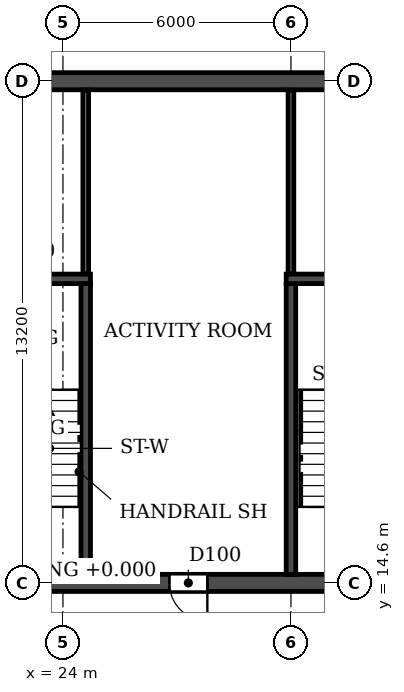
"""IFC4 building model, lengths in metres.
Left out: names, types, materials, properties, quantities, classifications, styles, units other than length and angle.
Written with IfcOpenShell. Run it as: python <this file> out.ifc"""

import sys

from ifc_helpers import new_model, si_unit, direction, frame, frame_2d, origin, place, context, subcontext, project, spatial, rectangle, extrude, element, fill, save


model = new_model("IFC4")
c1 = context("Model", 3, precision=1e-05, world=origin(), true_north=direction((0.0, 1.0)))
c2 = subcontext(c1, "Body", "Model", "MODEL_VIEW")
j1 = project(units=[si_unit("LENGTHUNIT", "METRE"), si_unit("PLANEANGLEUNIT", "RADIAN")], contexts=[c1])
p1 = place(None, origin())
s1 = spatial("IfcSite", under=j1, at=p1, CompositionType="ELEMENT")
p2 = place(p1, origin())
s2 = spatial("IfcBuilding", under=s1, at=p2, CompositionType="ELEMENT")
p3 = place(p2, frame((0.0, 0.0, 152.1)))
s3 = spatial("IfcBuildingStorey", under=s2, at=p3, CompositionType="ELEMENT", Elevation=152.1)
p4 = place(p3, frame((12.2, 14.6, 0.0), z_axis=(0.0, 0.0, 1.0), x_axis=(1.0, 0.0, 0.0)))
e1 = element("IfcWall", 1, at=p4, inside=s3, PredefinedType="SOLIDWALL", context=c2, shape_type="SweptSolid", body=[
    extrude(rectangle(XDim=77.6, YDim=0.45, at=frame_2d((38.8, 0.0))), origin(), (0.0, 0.0, 1.0), 3.07),
])
p5 = place(p4, frame((2.3, 0.0, 0.0)))
e2 = element("IfcOpeningElement", 2, at=p5, cuts=e1, PredefinedType="OPENING", context=c2, shape_type="SweptSolid", body=[
    extrude(rectangle(XDim=1.0, YDim=2.1, at=frame_2d((0.5, 1.05))), frame((0.0, 0.235, 0.0), z_axis=(0.0, -1.0, 0.0), x_axis=(1.0, 0.0, 0.0)), (0.0, 0.0, 1.0), 0.47),
])
p6 = place(p4, frame((6.7, 0.0, 0.0)))
e3 = element("IfcOpeningElement", 3, at=p6, cuts=e1, PredefinedType="OPENING", context=c2, shape_type="SweptSolid", body=[
    extrude(rectangle(XDim=1.0, YDim=2.1, at=frame_2d((0.5, 1.05))), frame((0.0, 0.235, 0.0), z_axis=(0.0, -1.0, 0.0), x_axis=(1.0, 0.0, 0.0)), (0.0, 0.0, 1.0), 0.47),
])
p7 = place(p4, frame((14.6, 0.0, 0.0)))
e4 = element("IfcOpeningElement", 4, at=p7, cuts=e1, PredefinedType="OPENING", context=c2, shape_type="SweptSolid", body=[
    extrude(rectangle(XDim=1.0, YDim=2.1, at=frame_2d((0.5, 1.05))), frame((0.0, 0.235, 0.0), z_axis=(0.0, -1.0, 0.0), x_axis=(1.0, 0.0, 0.0)), (0.0, 0.0, 1.0), 0.47),
])
p8 = place(p4, frame((19.2, 0.0, 0.0)))
e5 = element("IfcOpeningElement", 5, at=p8, cuts=e1, PredefinedType="OPENING", context=c2, shape_type="SweptSolid", body=[
    extrude(rectangle(XDim=1.0, YDim=2.1, at=frame_2d((0.5, 1.05))), frame((0.0, 0.235, 0.0), z_axis=(0.0, -1.0, 0.0), x_axis=(1.0, 0.0, 0.0)), (0.0, 0.0, 1.0), 0.47),
])
p9 = place(p4, frame((30.5, 0.0, 0.0)))
e6 = element("IfcOpeningElement", 6, at=p9, cuts=e1, PredefinedType="OPENING", context=c2, shape_type="SweptSolid", body=[
    extrude(rectangle(XDim=1.0, YDim=2.1, at=frame_2d((0.5, 1.05))), frame((0.0, 0.235, 0.0), z_axis=(0.0, -1.0, 0.0), x_axis=(1.0, 0.0, 0.0)), (0.0, 0.0, 1.0), 0.47),
])
p10 = place(p4, frame((34.15, 0.0, 0.0)))
e7 = element("IfcOpeningElement", 7, at=p10, cuts=e1, PredefinedType="OPENING", context=c2, shape_type="SweptSolid", body=[
    extrude(rectangle(XDim=1.5, YDim=2.1, at=frame_2d((0.75, 1.05))), frame((0.0, 0.235, 0.0), z_axis=(0.0, -1.0, 0.0), x_axis=(1.0, 0.0, 0.0)), (0.0, 0.0, 1.0), 0.47),
])
p11 = place(p4, frame((38.3, 0.0, 0.0)))
e8 = element("IfcOpeningElement", 8, at=p11, cuts=e1, PredefinedType="OPENING", context=c2, shape_type="SweptSolid", body=[
    extrude(rectangle(XDim=1.0, YDim=2.1, at=frame_2d((0.5, 1.05))), frame((0.0, 0.235, 0.0), z_axis=(0.0, -1.0, 0.0), x_axis=(1.0, 0.0, 0.0)), (0.0, 0.0, 1.0), 0.47),
])
p12 = place(p4, frame((43.5, 0.0, 0.0)))
e9 = element("IfcOpeningElement", 9, at=p12, cuts=e1, PredefinedType="OPENING", context=c2, shape_type="SweptSolid", body=[
    extrude(rectangle(XDim=1.0, YDim=2.1, at=frame_2d((0.5, 1.05))), frame((0.0, 0.235, 0.0), z_axis=(0.0, -1.0, 0.0), x_axis=(1.0, 0.0, 0.0)), (0.0, 0.0, 1.0), 0.47),
])
p13 = place(p4, frame((57.4, 0.0, 0.0)))
e10 = element("IfcOpeningElement", 10, at=p13, cuts=e1, PredefinedType="OPENING", context=c2, shape_type="SweptSolid", body=[
    extrude(rectangle(XDim=1.0, YDim=2.1, at=frame_2d((0.5, 1.05))), frame((0.0, 0.235, 0.0), z_axis=(0.0, -1.0, 0.0), x_axis=(1.0, 0.0, 0.0)), (0.0, 0.0, 1.0), 0.47),
])
p14 = place(p4, frame((62.0, 0.0, 0.0)))
e11 = element("IfcOpeningElement", 11, at=p14, cuts=e1, PredefinedType="OPENING", context=c2, shape_type="SweptSolid", body=[
    extrude(rectangle(XDim=1.0, YDim=2.1, at=frame_2d((0.5, 1.05))), frame((0.0, 0.235, 0.0), z_axis=(0.0, -1.0, 0.0), x_axis=(1.0, 0.0, 0.0)), (0.0, 0.0, 1.0), 0.47),
])
p15 = place(p4, frame((69.9, 0.0, 0.0)))
e12 = element("IfcOpeningElement", 12, at=p15, cuts=e1, PredefinedType="OPENING", context=c2, shape_type="SweptSolid", body=[
    extrude(rectangle(XDim=1.0, YDim=2.1, at=frame_2d((0.5, 1.05))), frame((0.0, 0.235, 0.0), z_axis=(0.0, -1.0, 0.0), x_axis=(1.0, 0.0, 0.0)), (0.0, 0.0, 1.0), 0.47),
])
p16 = place(p4, frame((74.3, 0.0, 0.0)))
e13 = element("IfcOpeningElement", 13, at=p16, cuts=e1, PredefinedType="OPENING", context=c2, shape_type="SweptSolid", body=[
    extrude(rectangle(XDim=1.0, YDim=2.1, at=frame_2d((0.5, 1.05))), frame((0.0, 0.235, 0.0), z_axis=(0.0, -1.0, 0.0), x_axis=(1.0, 0.0, 0.0)), (0.0, 0.0, 1.0), 0.47),
])
p17 = place(p3, frame((12.2, 27.8, 0.0), z_axis=(0.0, 0.0, 1.0), x_axis=(1.0, 0.0, 0.0)))
e14 = element("IfcWall", 14, at=p17, inside=s3, PredefinedType="SOLIDWALL", context=c2, shape_type="SweptSolid", body=[
    extrude(rectangle(XDim=77.6, YDim=0.45, at=frame_2d((38.8, 0.0))), origin(), (0.0, 0.0, 1.0), 3.07),
])
p18 = place(p17, frame((2.3, 0.0, 0.0)))
e15 = element("IfcOpeningElement", 15, at=p18, cuts=e14, PredefinedType="OPENING", context=c2, shape_type="SweptSolid", body=[
    extrude(rectangle(XDim=1.0, YDim=2.1, at=frame_2d((0.5, 1.05))), frame((0.0, 0.235, 0.0), z_axis=(0.0, -1.0, 0.0), x_axis=(1.0, 0.0, 0.0)), (0.0, 0.0, 1.0), 0.47),
])
p19 = place(p17, frame((6.7, 0.0, 0.0)))
e16 = element("IfcOpeningElement", 16, at=p19, cuts=e14, PredefinedType="OPENING", context=c2, shape_type="SweptSolid", body=[
    extrude(rectangle(XDim=1.0, YDim=2.1, at=frame_2d((0.5, 1.05))), frame((0.0, 0.235, 0.0), z_axis=(0.0, -1.0, 0.0), x_axis=(1.0, 0.0, 0.0)), (0.0, 0.0, 1.0), 0.47),
])
p20 = place(p17, frame((10.05, 0.0, 0.0)))
e17 = element("IfcOpeningElement", 17, at=p20, cuts=e14, PredefinedType="OPENING", context=c2, shape_type="SweptSolid", body=[
    extrude(rectangle(XDim=0.9, YDim=2.1, at=frame_2d((0.45, 1.05))), frame((0.0, 0.235, 0.0), z_axis=(0.0, -1.0, 0.0), x_axis=(1.0, 0.0, 0.0)), (0.0, 0.0, 1.0), 0.47),
])
p21 = place(p17, frame((19.25, 0.0, 0.0)))
e18 = element("IfcOpeningElement", 18, at=p21, cuts=e14, PredefinedType="OPENING", context=c2, shape_type="SweptSolid", body=[
    extrude(rectangle(XDim=0.9, YDim=2.1, at=frame_2d((0.45, 1.05))), frame((0.0, 0.235, 0.0), z_axis=(0.0, -1.0, 0.0), x_axis=(1.0, 0.0, 0.0)), (0.0, 0.0, 1.0), 0.47),
])
p22 = place(p17, frame((22.4, 0.0, 0.0)))
e19 = element("IfcOpeningElement", 19, at=p22, cuts=e14, PredefinedType="OPENING", context=c2, shape_type="SweptSolid", body=[
    extrude(rectangle(XDim=1.0, YDim=2.1, at=frame_2d((0.5, 1.05))), frame((0.0, 0.235, 0.0), z_axis=(0.0, -1.0, 0.0), x_axis=(1.0, 0.0, 0.0)), (0.0, 0.0, 1.0), 0.47),
])
p23 = place(p17, frame((27.6, 0.0, 0.0)))
e20 = element("IfcOpeningElement", 20, at=p23, cuts=e14, PredefinedType="OPENING", context=c2, shape_type="SweptSolid", body=[
    extrude(rectangle(XDim=1.0, YDim=2.1, at=frame_2d((0.5, 1.05))), frame((0.0, 0.235, 0.0), z_axis=(0.0, -1.0, 0.0), x_axis=(1.0, 0.0, 0.0)), (0.0, 0.0, 1.0), 0.47),
])
p24 = place(p17, frame((35.4, 0.0, 0.0)))
e21 = element("IfcOpeningElement", 21, at=p24, cuts=e14, PredefinedType="OPENING", context=c2, shape_type="SweptSolid", body=[
    extrude(rectangle(XDim=1.0, YDim=2.1, at=frame_2d((0.5, 1.05))), frame((0.0, 0.235, 0.0), z_axis=(0.0, -1.0, 0.0), x_axis=(1.0, 0.0, 0.0)), (0.0, 0.0, 1.0), 0.47),
])
p25 = place(p17, frame((38.3, 0.0, 0.0)))
e22 = element("IfcOpeningElement", 22, at=p25, cuts=e14, PredefinedType="OPENING", context=c2, shape_type="SweptSolid", body=[
    extrude(rectangle(XDim=1.0, YDim=2.1, at=frame_2d((0.5, 1.05))), frame((0.0, 0.235, 0.0), z_axis=(0.0, -1.0, 0.0), x_axis=(1.0, 0.0, 0.0)), (0.0, 0.0, 1.0), 0.47),
])
p26 = place(p17, frame((42.25, 0.0, 0.0)))
e23 = element("IfcOpeningElement", 23, at=p26, cuts=e14, PredefinedType="OPENING", context=c2, shape_type="SweptSolid", body=[
    extrude(rectangle(XDim=1.5, YDim=2.1, at=frame_2d((0.75, 1.05))), frame((0.0, 0.235, 0.0), z_axis=(0.0, -1.0, 0.0), x_axis=(1.0, 0.0, 0.0)), (0.0, 0.0, 1.0), 0.47),
])
p27 = place(p17, frame((47.7, 0.0, 0.0)))
e24 = element("IfcOpeningElement", 24, at=p27, cuts=e14, PredefinedType="OPENING", context=c2, shape_type="SweptSolid", body=[
    extrude(rectangle(XDim=1.0, YDim=2.1, at=frame_2d((0.5, 1.05))), frame((0.0, 0.235, 0.0), z_axis=(0.0, -1.0, 0.0), x_axis=(1.0, 0.0, 0.0)), (0.0, 0.0, 1.0), 0.47),
])
p28 = place(p17, frame((51.6, 0.0, 0.0)))
e25 = element("IfcOpeningElement", 25, at=p28, cuts=e14, PredefinedType="OPENING", context=c2, shape_type="SweptSolid", body=[
    extrude(rectangle(XDim=1.0, YDim=2.1, at=frame_2d((0.5, 1.05))), frame((0.0, 0.235, 0.0), z_axis=(0.0, -1.0, 0.0), x_axis=(1.0, 0.0, 0.0)), (0.0, 0.0, 1.0), 0.47),
])
p29 = place(p17, frame((54.2, 0.0, 0.0)))
e26 = element("IfcOpeningElement", 26, at=p29, cuts=e14, PredefinedType="OPENING", context=c2, shape_type="SweptSolid", body=[
    extrude(rectangle(XDim=1.0, YDim=2.1, at=frame_2d((0.5, 1.05))), frame((0.0, 0.235, 0.0), z_axis=(0.0, -1.0, 0.0), x_axis=(1.0, 0.0, 0.0)), (0.0, 0.0, 1.0), 0.47),
])
p30 = place(p17, frame((57.45, 0.0, 0.0)))
e27 = element("IfcOpeningElement", 27, at=p30, cuts=e14, PredefinedType="OPENING", context=c2, shape_type="SweptSolid", body=[
    extrude(rectangle(XDim=0.9, YDim=2.1, at=frame_2d((0.45, 1.05))), frame((0.0, 0.235, 0.0), z_axis=(0.0, -1.0, 0.0), x_axis=(1.0, 0.0, 0.0)), (0.0, 0.0, 1.0), 0.47),
])
p31 = place(p17, frame((66.65, 0.0, 0.0)))
e28 = element("IfcOpeningElement", 28, at=p31, cuts=e14, PredefinedType="OPENING", context=c2, shape_type="SweptSolid", body=[
    extrude(rectangle(XDim=0.9, YDim=2.1, at=frame_2d((0.45, 1.05))), frame((0.0, 0.235, 0.0), z_axis=(0.0, -1.0, 0.0), x_axis=(1.0, 0.0, 0.0)), (0.0, 0.0, 1.0), 0.47),
])
p32 = place(p17, frame((69.9, 0.0, 0.0)))
e29 = element("IfcOpeningElement", 29, at=p32, cuts=e14, PredefinedType="OPENING", context=c2, shape_type="SweptSolid", body=[
    extrude(rectangle(XDim=1.0, YDim=2.1, at=frame_2d((0.5, 1.05))), frame((0.0, 0.235, 0.0), z_axis=(0.0, -1.0, 0.0), x_axis=(1.0, 0.0, 0.0)), (0.0, 0.0, 1.0), 0.47),
])
p33 = place(p17, frame((74.3, 0.0, 0.0)))
e30 = element("IfcOpeningElement", 30, at=p33, cuts=e14, PredefinedType="OPENING", context=c2, shape_type="SweptSolid", body=[
    extrude(rectangle(XDim=1.0, YDim=2.1, at=frame_2d((0.5, 1.05))), frame((0.0, 0.235, 0.0), z_axis=(0.0, -1.0, 0.0), x_axis=(1.0, 0.0, 0.0)), (0.0, 0.0, 1.0), 0.47),
])
p34 = place(p3, frame((30.0, 14.825, 0.0), z_axis=(0.0, 0.0, 1.0), x_axis=(0.0, 1.0, 0.0)))
e31 = element("IfcWall", 31, at=p34, inside=s3, PredefinedType="SOLIDWALL", context=c2, shape_type="SweptSolid", body=[
    extrude(rectangle(XDim=7.65, YDim=0.25, at=frame_2d((3.825, 0.0))), origin(), (0.0, 0.0, 1.0), 3.07),
])
p35 = place(p3, frame((29.875, 22.6, 0.0), z_axis=(0.0, 0.0, 1.0), x_axis=(1.0, 0.0, 0.0)))
e32 = element("IfcWall", 32, at=p35, inside=s3, PredefinedType="SOLIDWALL", context=c2, shape_type="SweptSolid", body=[
    extrude(rectangle(XDim=4.05, YDim=0.25, at=frame_2d((2.025, 0.0))), origin(), (0.0, 0.0, 1.0), 3.07),
])
p36 = place(p3, frame((24.6, 14.825, 0.0), z_axis=(0.0, 0.0, 1.0), x_axis=(0.0, 1.0, 0.0)))
e33 = element("IfcWall", 33, at=p36, inside=s3, PredefinedType="SOLIDWALL", context=c2, shape_type="SweptSolid", body=[
    extrude(rectangle(XDim=7.65, YDim=0.25, at=frame_2d((3.825, 0.0))), origin(), (0.0, 0.0, 1.0), 3.07),
])
p37 = place(p3, frame((20.675, 22.6, 0.0), z_axis=(0.0, 0.0, 1.0), x_axis=(1.0, 0.0, 0.0)))
e34 = element("IfcWall", 34, at=p37, inside=s3, PredefinedType="SOLIDWALL", context=c2, shape_type="SweptSolid", body=[
    extrude(rectangle(XDim=4.05, YDim=0.25, at=frame_2d((2.025, 0.0))), origin(), (0.0, 0.0, 1.0), 3.07),
])
for number, where, z_axis, x_axis in (
    (35, (24.6, 22.735, 0.0), (0.0, 0.0, 1.0), (0.0, 1.0, 0.0)),
    (36, (30.0, 22.735, 0.0), (0.0, 0.0, 1.0), (0.0, 1.0, 0.0)),
):
    element("IfcWall", number, at=place(p3, frame(where, z_axis=z_axis, x_axis=x_axis)), inside=s3, PredefinedType="PARTITIONING", context=c2, shape_type="SweptSolid", body=[
        extrude(rectangle(XDim=4.83, YDim=0.15, at=frame_2d((2.415, 0.0))), origin(), (0.0, 0.0, 1.0), 3.07),
    ])
p38 = place(p7, frame((1.0, 0.0, 0.0), z_axis=(0.0, 0.0, 1.0), x_axis=(-1.0, 0.0, 0.0)))
e37 = element("IfcDoor", 37, at=p38, inside=s3, OperationType="SINGLE_SWING_LEFT", PredefinedType="DOOR", context=c2, shape_type="SweptSolid", body=[
    extrude(rectangle(XDim=1.0, YDim=2.1, at=frame_2d((0.5, 1.05))), frame((0.0, 0.025, 0.0), z_axis=(0.0, -1.0, 0.0), x_axis=(1.0, 0.0, 0.0)), (0.0, 0.0, 1.0), 0.05),
])
fill(e4, e37)
save(model, sys.argv[1])
